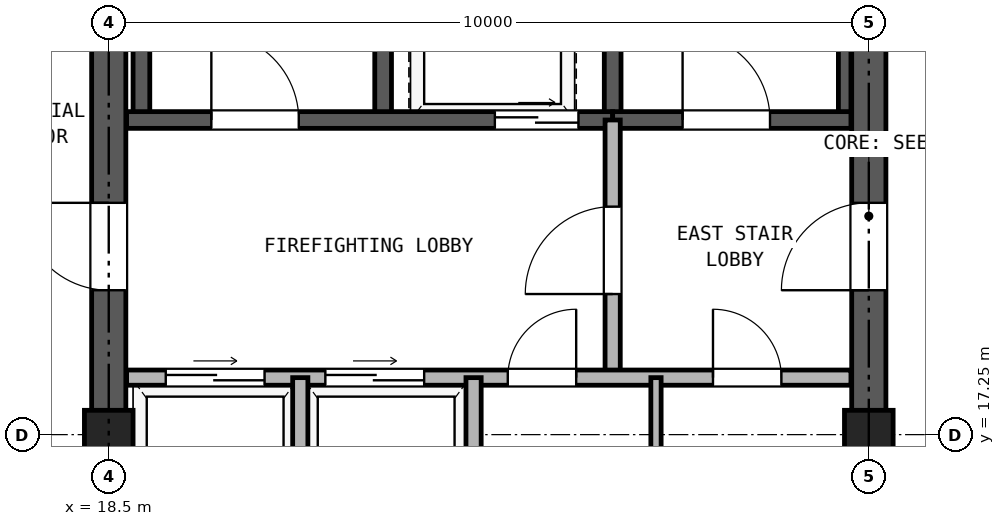
"""IFC4 building model, lengths in metres.
Left out: names, types, materials, properties, quantities, classifications, styles, units other than length and angle.
Written with IfcOpenShell. Run it as: python <this file> out.ifc"""

import sys

from ifc_helpers import new_model, si_unit, direction, frame, frame_2d, origin, origin_2d, place, context, subcontext, project, spatial, rectangle, hollow_rectangle, extrude, source, transform, mapped, element, fill, save


model = new_model("IFC4")
c1 = context("Model", 3, precision=1e-05, world=origin(), true_north=direction((0.0, 1.0)))
c2 = subcontext(c1, "Body", "Model", "MODEL_VIEW")
j1 = project(units=[si_unit("LENGTHUNIT", "METRE"), si_unit("PLANEANGLEUNIT", "RADIAN")], contexts=[c1])
p1 = place(None, origin())
s1 = spatial("IfcSite", under=j1, at=p1, CompositionType="ELEMENT")
p2 = place(p1, origin())
s2 = spatial("IfcBuilding", under=s1, at=p2, CompositionType="ELEMENT")
p3 = place(p2, frame((0.0, 0.0, 209.2)))
s3 = spatial("IfcBuildingStorey", under=s2, at=p3, CompositionType="ELEMENT", Elevation=209.2)
m1 = source(origin(), c2, "Body", "SweptSolid", [
    extrude(hollow_rectangle(XDim=0.64, YDim=0.64, WallThickness=0.035, at=origin_2d()), origin(), (0.0, 0.0, 1.0), 2.95),
])
for number, where, z_axis, x_axis in (
    (1, (18.5, 17.25, 0.0), (0.0, 0.0, 1.0), (1.0, 0.0, 0.0)),
    (2, (28.5, 17.25, 0.0), (0.0, 0.0, 1.0), (1.0, 0.0, 0.0)),
):
    element("IfcColumn", number, at=place(p3, frame(where, z_axis=z_axis, x_axis=x_axis)), inside=s3, PredefinedType="COLUMN", context=c2, shape_type="MappedRepresentation", body=[
        mapped(m1, transform((0.0, 0.0, 0.0), x_axis=(1.0, 0.0, 0.0), y_axis=(0.0, 1.0, 0.0), z_axis=(0.0, 0.0, 1.0), scale=1.0)),
    ])
p4 = place(p3, frame((18.5, 11.725, 0.0), z_axis=(0.0, 0.0, 1.0), x_axis=(0.0, 1.0, 0.0)))
e3 = element("IfcWall", 3, at=p4, inside=s3, PredefinedType="SHEAR", context=c2, shape_type="SweptSolid", body=[
    extrude(rectangle(XDim=16.8, YDim=0.45, at=frame_2d((8.4, 0.0))), origin(), (0.0, 0.0, 1.0), 2.95),
])
p5 = place(p4, frame((7.425, 0.0, 0.0)))
e4 = element("IfcOpeningElement", 4, at=p5, cuts=e3, PredefinedType="OPENING", context=c2, shape_type="SweptSolid", body=[
    extrude(rectangle(XDim=1.15, YDim=2.2, at=frame_2d((0.575, 1.1))), frame((0.0, 0.235, 0.0), z_axis=(0.0, -1.0, 0.0), x_axis=(1.0, 0.0, 0.0)), (0.0, 0.0, 1.0), 0.47),
])
p6 = place(p3, frame((28.5, 11.725, 0.0), z_axis=(0.0, 0.0, 1.0), x_axis=(0.0, 1.0, 0.0)))
e5 = element("IfcWall", 5, at=p6, inside=s3, PredefinedType="SHEAR", context=c2, shape_type="SweptSolid", body=[
    extrude(rectangle(XDim=16.8, YDim=0.45, at=frame_2d((8.4, 0.0))), origin(), (0.0, 0.0, 1.0), 2.95),
])
p7 = place(p6, frame((7.425, 0.0, 0.0)))
e6 = element("IfcOpeningElement", 6, at=p7, cuts=e5, PredefinedType="OPENING", context=c2, shape_type="SweptSolid", body=[
    extrude(rectangle(XDim=1.15, YDim=2.2, at=frame_2d((0.575, 1.1))), frame((0.0, 0.235, 0.0), z_axis=(0.0, -1.0, 0.0), x_axis=(1.0, 0.0, 0.0)), (0.0, 0.0, 1.0), 0.47),
])
for number, where, z_axis, x_axis in (
    (7, (18.93, 21.39, 0.0), (0.0, 0.0, 1.0), (0.0, 1.0, 0.0)),
    (8, (22.11, 21.39, 0.0), (0.0, 0.0, 1.0), (0.0, 1.0, 0.0)),
    (9, (25.13, 21.39, 0.0), (0.0, 0.0, 1.0), (0.0, 1.0, 0.0)),
):
    element("IfcWall", number, at=place(p3, frame(where, z_axis=z_axis, x_axis=x_axis)), inside=s3, PredefinedType="SOLIDWALL", context=c2, shape_type="SweptSolid", body=[
        extrude(rectangle(XDim=7.11, YDim=0.22, at=frame_2d((3.555, 0.0))), origin(), (0.0, 0.0, 1.0), 2.95),
    ])
p8 = place(p3, frame((28.183, 21.39, 0.0), z_axis=(0.0, 0.0, 1.0), x_axis=(0.0, 1.0, 0.0)))
e10 = element("IfcWall", 10, at=p8, inside=s3, PredefinedType="PARTITIONING", context=c2, shape_type="SweptSolid", body=[
    extrude(rectangle(XDim=6.945, YDim=0.165, at=frame_2d((3.473, 0.0))), origin(), (0.0, 0.0, 1.0), 2.95),
])
p9 = place(p3, frame((18.735, 21.39, 0.0), z_axis=(0.0, 0.0, 1.0), x_axis=(1.0, 0.0, 0.0)))
e11 = element("IfcWall", 11, at=p9, inside=s3, PredefinedType="SOLIDWALL", context=c2, shape_type="SweptSolid", body=[
    extrude(rectangle(XDim=6.395, YDim=0.22, at=frame_2d((3.197, 0.0))), origin(), (0.0, 0.0, 1.0), 2.95),
])
p10 = place(p9, frame((1.115, 0.0, 0.0)))
e12 = element("IfcOpeningElement", 12, at=p10, cuts=e11, PredefinedType="OPENING", context=c2, shape_type="SweptSolid", body=[
    extrude(rectangle(XDim=1.15, YDim=2.2, at=frame_2d((0.575, 1.1))), frame((0.0, 0.12, 0.0), z_axis=(0.0, -1.0, 0.0), x_axis=(1.0, 0.0, 0.0)), (0.0, 0.0, 1.0), 0.24),
])
p11 = place(p9, frame((4.845, 0.0, 0.0)))
e13 = element("IfcOpeningElement", 13, at=p11, cuts=e11, PredefinedType="OPENING", context=c2, shape_type="SweptSolid", body=[
    extrude(rectangle(XDim=1.1, YDim=2.25, at=frame_2d((0.55, 1.125))), frame((0.0, 0.12, 0.0), z_axis=(0.0, -1.0, 0.0), x_axis=(1.0, 0.0, 0.0)), (0.0, 0.0, 1.0), 0.24),
])
p12 = place(p3, frame((25.13, 21.39, 0.0), z_axis=(0.0, 0.0, 1.0), x_axis=(1.0, 0.0, 0.0)))
e14 = element("IfcWall", 14, at=p12, inside=s3, PredefinedType="SOLIDWALL", context=c2, shape_type="SweptSolid", body=[
    extrude(rectangle(XDim=3.135, YDim=0.22, at=frame_2d((1.567, 0.0))), origin(), (0.0, 0.0, 1.0), 2.95),
])
p13 = place(p12, frame((0.92, 0.0, 0.0)))
e15 = element("IfcOpeningElement", 15, at=p13, cuts=e14, PredefinedType="OPENING", context=c2, shape_type="SweptSolid", body=[
    extrude(rectangle(XDim=1.15, YDim=2.2, at=frame_2d((0.575, 1.1))), frame((0.0, 0.12, 0.0), z_axis=(0.0, -1.0, 0.0), x_axis=(1.0, 0.0, 0.0)), (0.0, 0.0, 1.0), 0.24),
])
p14 = place(p3, frame((25.13, 18.0, 0.0), z_axis=(0.0, 0.0, 1.0), x_axis=(0.0, 1.0, 0.0)))
e16 = element("IfcWall", 16, at=p14, inside=s3, PredefinedType="PARTITIONING", context=c2, shape_type="SweptSolid", body=[
    extrude(rectangle(XDim=3.39, YDim=0.2, at=frame_2d((1.695, 0.0))), origin(), (0.0, 0.0, 1.0), 2.95),
])
p15 = place(p14, frame((1.1, 0.0, 0.0)))
e17 = element("IfcOpeningElement", 17, at=p15, cuts=e16, PredefinedType="OPENING", context=c2, shape_type="SweptSolid", body=[
    extrude(rectangle(XDim=1.15, YDim=2.2, at=frame_2d((0.575, 1.1))), frame((0.0, 0.11, 0.0), z_axis=(0.0, -1.0, 0.0), x_axis=(1.0, 0.0, 0.0)), (0.0, 0.0, 1.0), 0.22),
])
p16 = place(p3, frame((18.735, 18.0, 0.0), z_axis=(0.0, 0.0, 1.0), x_axis=(1.0, 0.0, 0.0)))
e18 = element("IfcWall", 18, at=p16, inside=s3, PredefinedType="PARTITIONING", context=c2, shape_type="SweptSolid", body=[
    extrude(rectangle(XDim=9.53, YDim=0.2, at=frame_2d((4.765, 0.0))), origin(), (0.0, 0.0, 1.0), 2.95),
])
p17 = place(p16, frame((0.515, 0.0, 0.0)))
e19 = element("IfcOpeningElement", 19, at=p17, cuts=e18, PredefinedType="OPENING", context=c2, shape_type="SweptSolid", body=[
    extrude(rectangle(XDim=1.3, YDim=2.3, at=frame_2d((0.65, 1.15))), frame((0.0, 0.11, 0.0), z_axis=(0.0, -1.0, 0.0), x_axis=(1.0, 0.0, 0.0)), (0.0, 0.0, 1.0), 0.22),
])
p18 = place(p16, frame((2.615, 0.0, 0.0)))
e20 = element("IfcOpeningElement", 20, at=p18, cuts=e18, PredefinedType="OPENING", context=c2, shape_type="SweptSolid", body=[
    extrude(rectangle(XDim=1.3, YDim=2.3, at=frame_2d((0.65, 1.15))), frame((0.0, 0.11, 0.0), z_axis=(0.0, -1.0, 0.0), x_axis=(1.0, 0.0, 0.0)), (0.0, 0.0, 1.0), 0.22),
])
p19 = place(p16, frame((5.015, 0.0, 0.0)))
e21 = element("IfcOpeningElement", 21, at=p19, cuts=e18, PredefinedType="OPENING", context=c2, shape_type="SweptSolid", body=[
    extrude(rectangle(XDim=0.9, YDim=2.05, at=frame_2d((0.45, 1.025))), frame((0.0, 0.11, 0.0), z_axis=(0.0, -1.0, 0.0), x_axis=(1.0, 0.0, 0.0)), (0.0, 0.0, 1.0), 0.22),
])
p20 = place(p16, frame((7.715, 0.0, 0.0)))
e22 = element("IfcOpeningElement", 22, at=p20, cuts=e18, PredefinedType="OPENING", context=c2, shape_type="SweptSolid", body=[
    extrude(rectangle(XDim=0.9, YDim=2.05, at=frame_2d((0.45, 1.025))), frame((0.0, 0.11, 0.0), z_axis=(0.0, -1.0, 0.0), x_axis=(1.0, 0.0, 0.0)), (0.0, 0.0, 1.0), 0.22),
])
for number, where, z_axis, x_axis in (
    (23, (21.02, 15.0, 0.0), (0.0, 0.0, 1.0), (0.0, 1.0, 0.0)),
    (24, (23.3, 15.0, 0.0), (0.0, 0.0, 1.0), (0.0, 1.0, 0.0)),
):
    element("IfcWall", number, at=place(p3, frame(where, z_axis=z_axis, x_axis=x_axis)), inside=s3, PredefinedType="PARTITIONING", context=c2, shape_type="SweptSolid", body=[
        extrude(rectangle(XDim=3.0, YDim=0.2, at=frame_2d((1.5, 0.0))), origin(), (0.0, 0.0, 1.0), 2.95),
    ])
p21 = place(p3, frame((25.7, 15.0, 0.0), z_axis=(0.0, 0.0, 1.0), x_axis=(0.0, 1.0, 0.0)))
e25 = element("IfcWall", 25, at=p21, inside=s3, PredefinedType="PARTITIONING", context=c2, shape_type="SweptSolid", body=[
    extrude(rectangle(XDim=3.0, YDim=0.135, at=frame_2d((1.5, 0.0))), origin(), (0.0, 0.0, 1.0), 2.95),
])
p22 = place(p10, frame((1.15, 0.0, 0.0), z_axis=(0.0, 0.0, 1.0), x_axis=(-1.0, 0.0, 0.0)))
e26 = element("IfcDoor", 26, at=p22, inside=s3, OperationType="SINGLE_SWING_LEFT", PredefinedType="DOOR", context=c2, shape_type="SweptSolid", body=[
    extrude(rectangle(XDim=1.15, YDim=2.2, at=frame_2d((0.575, 1.1))), frame((0.0, 0.025, 0.0), z_axis=(0.0, -1.0, 0.0), x_axis=(1.0, 0.0, 0.0)), (0.0, 0.0, 1.0), 0.05),
])
fill(e12, e26)
p23 = place(p13, frame((1.15, 0.0, 0.0), z_axis=(0.0, 0.0, 1.0), x_axis=(-1.0, 0.0, 0.0)))
e27 = element("IfcDoor", 27, at=p23, inside=s3, OperationType="SINGLE_SWING_LEFT", PredefinedType="DOOR", context=c2, shape_type="SweptSolid", body=[
    extrude(rectangle(XDim=1.15, YDim=2.2, at=frame_2d((0.575, 1.1))), frame((0.0, 0.025, 0.0), z_axis=(0.0, -1.0, 0.0), x_axis=(1.0, 0.0, 0.0)), (0.0, 0.0, 1.0), 0.05),
])
fill(e15, e27)
p24 = place(p11, frame((1.1, 0.0, 0.0), z_axis=(0.0, 0.0, 1.0), x_axis=(-1.0, 0.0, 0.0)))
e28 = element("IfcDoor", 28, at=p24, inside=s3, OperationType="DOUBLE_DOOR_SLIDING", PredefinedType="DOOR", context=c2, shape_type="SweptSolid", body=[
    extrude(rectangle(XDim=1.1, YDim=2.25, at=frame_2d((0.55, 1.125))), frame((0.0, 0.025, 0.0), z_axis=(0.0, -1.0, 0.0), x_axis=(1.0, 0.0, 0.0)), (0.0, 0.0, 1.0), 0.05),
])
fill(e13, e28)
p25 = place(p15, origin())
e29 = element("IfcDoor", 29, at=p25, inside=s3, OperationType="SINGLE_SWING_LEFT", PredefinedType="DOOR", context=c2, shape_type="SweptSolid", body=[
    extrude(rectangle(XDim=1.15, YDim=2.2, at=frame_2d((0.575, 1.1))), frame((0.0, 0.025, 0.0), z_axis=(0.0, -1.0, 0.0), x_axis=(1.0, 0.0, 0.0)), (0.0, 0.0, 1.0), 0.05),
])
fill(e17, e29)
p26 = place(p17, origin())
e30 = element("IfcDoor", 30, at=p26, inside=s3, OperationType="DOUBLE_DOOR_SLIDING", PredefinedType="DOOR", context=c2, shape_type="SweptSolid", body=[
    extrude(rectangle(XDim=1.3, YDim=2.3, at=frame_2d((0.65, 1.15))), frame((0.0, 0.025, 0.0), z_axis=(0.0, -1.0, 0.0), x_axis=(1.0, 0.0, 0.0)), (0.0, 0.0, 1.0), 0.05),
])
fill(e19, e30)
p27 = place(p18, origin())
e31 = element("IfcDoor", 31, at=p27, inside=s3, OperationType="DOUBLE_DOOR_SLIDING", PredefinedType="DOOR", context=c2, shape_type="SweptSolid", body=[
    extrude(rectangle(XDim=1.3, YDim=2.3, at=frame_2d((0.65, 1.15))), frame((0.0, 0.025, 0.0), z_axis=(0.0, -1.0, 0.0), x_axis=(1.0, 0.0, 0.0)), (0.0, 0.0, 1.0), 0.05),
])
fill(e20, e31)
p28 = place(p19, frame((0.9, 0.0, 0.0), z_axis=(0.0, 0.0, 1.0), x_axis=(-1.0, 0.0, 0.0)))
e32 = element("IfcDoor", 32, at=p28, inside=s3, OperationType="SINGLE_SWING_RIGHT", PredefinedType="DOOR", context=c2, shape_type="SweptSolid", body=[
    extrude(rectangle(XDim=0.9, YDim=2.05, at=frame_2d((0.45, 1.025))), frame((0.0, 0.025, 0.0), z_axis=(0.0, -1.0, 0.0), x_axis=(1.0, 0.0, 0.0)), (0.0, 0.0, 1.0), 0.05),
])
fill(e21, e32)
p29 = place(p20, frame((0.9, 0.0, 0.0), z_axis=(0.0, 0.0, 1.0), x_axis=(-1.0, 0.0, 0.0)))
e33 = element("IfcDoor", 33, at=p29, inside=s3, OperationType="SINGLE_SWING_LEFT", PredefinedType="DOOR", context=c2, shape_type="SweptSolid", body=[
    extrude(rectangle(XDim=0.9, YDim=2.05, at=frame_2d((0.45, 1.025))), frame((0.0, 0.025, 0.0), z_axis=(0.0, -1.0, 0.0), x_axis=(1.0, 0.0, 0.0)), (0.0, 0.0, 1.0), 0.05),
])
fill(e22, e33)
p30 = place(p5, frame((1.15, 0.0, 0.0), z_axis=(0.0, 0.0, 1.0), x_axis=(-1.0, 0.0, 0.0)))
e34 = element("IfcDoor", 34, at=p30, inside=s3, OperationType="SINGLE_SWING_RIGHT", PredefinedType="DOOR", context=c2, shape_type="SweptSolid", body=[
    extrude(rectangle(XDim=1.15, YDim=2.2, at=frame_2d((0.575, 1.1))), frame((0.0, 0.025, 0.0), z_axis=(0.0, -1.0, 0.0), x_axis=(1.0, 0.0, 0.0)), (0.0, 0.0, 1.0), 0.05),
])
fill(e4, e34)
p31 = place(p7, origin())
e35 = element("IfcDoor", 35, at=p31, inside=s3, OperationType="SINGLE_SWING_LEFT", PredefinedType="DOOR", context=c2, shape_type="SweptSolid", body=[
    extrude(rectangle(XDim=1.15, YDim=2.2, at=frame_2d((0.575, 1.1))), frame((0.0, 0.025, 0.0), z_axis=(0.0, -1.0, 0.0), x_axis=(1.0, 0.0, 0.0)), (0.0, 0.0, 1.0), 0.05),
])
fill(e6, e35)
save(model, sys.argv[1])
